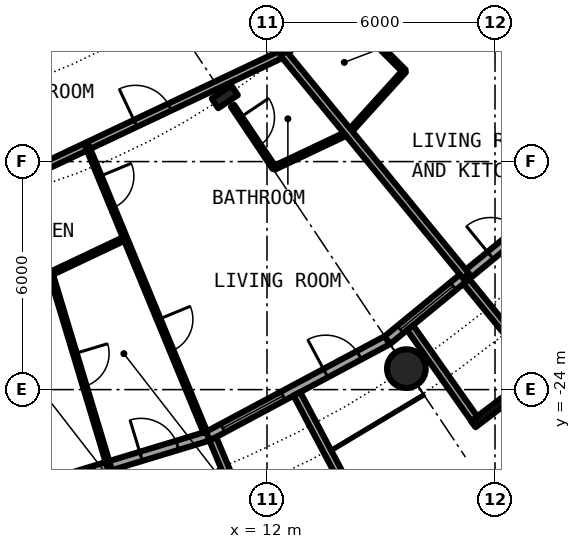
"""IFC4 building model, lengths in metres.
Left out: names, types, materials, properties, quantities, classifications, styles, units other than length and angle.
Written with IfcOpenShell. Run it as: python <this file> out.ifc"""

import sys

from ifc_helpers import new_model, si_unit, direction, frame, frame_2d, origin, origin_2d, place, context, subcontext, project, spatial, rectangle, circle, hollow_circle, i_section, extrude, element, fill, save


model = new_model("IFC4")
c1 = context("Model", 3, precision=1e-05, world=origin(), true_north=direction((0.0, 1.0)))
c2 = subcontext(c1, "Body", "Model", "MODEL_VIEW")
j1 = project(units=[si_unit("LENGTHUNIT", "METRE"), si_unit("PLANEANGLEUNIT", "RADIAN")], contexts=[c1])
p1 = place(None, origin())
s1 = spatial("IfcSite", under=j1, at=p1, CompositionType="ELEMENT")
p2 = place(p1, origin())
s2 = spatial("IfcBuilding", under=s1, at=p2, CompositionType="ELEMENT")
p3 = place(p2, frame((0.0, 0.0, 22.8)))
s3 = spatial("IfcBuildingStorey", under=s2, at=p3, CompositionType="ELEMENT", Elevation=22.8)
p4 = place(p3, frame((15.667, -23.448, 0.0), z_axis=(0.0, 0.0, 1.0), x_axis=(1.0, 0.0, 0.0)))
e1 = element("IfcColumn", 1, at=p4, inside=s3, PredefinedType="COLUMN", context=c2, shape_type="SweptSolid", body=[
    extrude(hollow_circle(Radius=0.508, WallThickness=0.05, at=origin_2d()), origin(), (0.0, 0.0, 1.0), 3.05),
])
p5 = place(p3, frame((10.889, -16.297, 0.0), z_axis=(0.0, 0.0, 1.0), x_axis=(0.55557023302, -0.831469612303, 0.0)))
e2 = element("IfcColumn", 2, at=p5, inside=s3, PredefinedType="COLUMN", context=c2, shape_type="SweptSolid", body=[
    extrude(i_section(OverallWidth=0.305, OverallDepth=0.62, WebThickness=0.021, FlangeThickness=0.04, FilletRadius=0.027, at=origin_2d()), origin(), (0.0, 0.0, 1.0), 3.05),
])
p6 = place(p3, frame((5.326, -26.775, 0.0), z_axis=(0.0, 0.0, 1.0), x_axis=(0.956965678721, 0.290201119486, 0.0)))
e3 = element("IfcWall", 3, at=p6, inside=s3, PredefinedType="SOLIDWALL", context=c2, shape_type="SweptSolid", body=[
    extrude(rectangle(XDim=5.351, YDim=0.25, at=frame_2d((2.676, 0.0))), origin(), (0.0, 0.0, 1.0), 2.7),
])
p7 = place(p6, frame((0.441, 0.0, 0.3)))
e4 = element("IfcOpeningElement", 4, at=p7, cuts=e3, PredefinedType="OPENING", context=c2, shape_type="SweptSolid", body=[
    extrude(rectangle(XDim=1.8, YDim=2.1, at=frame_2d((0.9, 1.05))), frame((0.0, 0.135, 0.0), z_axis=(0.0, -1.0, 0.0), x_axis=(1.0, 0.0, 0.0)), (0.0, 0.0, 1.0), 0.27),
])
p8 = place(p6, frame((3.51, 0.0, 0.0)))
e5 = element("IfcOpeningElement", 5, at=p8, cuts=e3, PredefinedType="OPENING", context=c2, shape_type="SweptSolid", body=[
    extrude(rectangle(XDim=1.0, YDim=2.2, at=frame_2d((0.5, 1.1))), frame((0.0, 0.135, 0.0), z_axis=(0.0, -1.0, 0.0), x_axis=(1.0, 0.0, 0.0)), (0.0, 0.0, 1.0), 0.27),
])
p9 = place(p3, frame((10.447, -25.222, 0.0), z_axis=(0.0, 0.0, 1.0), x_axis=(0.881915646801, 0.471407246368, 0.0)))
e6 = element("IfcWall", 6, at=p9, inside=s3, PredefinedType="SOLIDWALL", context=c2, shape_type="SweptSolid", body=[
    extrude(rectangle(XDim=5.352, YDim=0.25, at=frame_2d((2.676, 0.0))), origin(), (0.0, 0.0, 1.0), 2.7),
])
p10 = place(p9, frame((0.441, 0.0, 0.3)))
e7 = element("IfcOpeningElement", 7, at=p10, cuts=e6, PredefinedType="OPENING", context=c2, shape_type="SweptSolid", body=[
    extrude(rectangle(XDim=1.8, YDim=2.1, at=frame_2d((0.9, 1.05))), frame((0.0, 0.135, 0.0), z_axis=(0.0, -1.0, 0.0), x_axis=(1.0, 0.0, 0.0)), (0.0, 0.0, 1.0), 0.27),
])
p11 = place(p9, frame((3.51, 0.0, 0.0)))
e8 = element("IfcOpeningElement", 8, at=p11, cuts=e6, PredefinedType="OPENING", context=c2, shape_type="SweptSolid", body=[
    extrude(rectangle(XDim=1.0, YDim=2.2, at=frame_2d((0.5, 1.1))), frame((0.0, 0.135, 0.0), z_axis=(0.0, -1.0, 0.0), x_axis=(1.0, 0.0, 0.0)), (0.0, 0.0, 1.0), 0.27),
])
p12 = place(p3, frame((10.575, -25.295, -0.03), z_axis=(0.0, 0.0, 1.0), x_axis=(0.385697364644, -0.922625353492, 0.0)))
e9 = element("IfcWall", 9, at=p12, inside=s3, PredefinedType="SOLIDWALL", context=c2, shape_type="SweptSolid", body=[
    extrude(rectangle(XDim=2.883, YDim=0.2, at=frame_2d((1.442, 0.0))), origin(), (0.0, 0.0, 1.0), 2.73),
])
p13 = place(p3, frame((12.787, -24.113, -0.03), z_axis=(0.0, 0.0, 1.0), x_axis=(0.468365282436, -0.883534924159, 0.0)))
e10 = element("IfcWall", 10, at=p13, inside=s3, PredefinedType="SOLIDWALL", context=c2, shape_type="SweptSolid", body=[
    extrude(rectangle(XDim=3.006, YDim=0.2, at=frame_2d((1.503, 0.0))), origin(), (0.0, 0.0, 1.0), 2.73),
])
p14 = place(p3, frame((15.167, -22.699, 0.0), z_axis=(0.0, 0.0, 1.0), x_axis=(0.773019449054, 0.634382322723, 0.0)))
e11 = element("IfcWall", 11, at=p14, inside=s3, PredefinedType="SOLIDWALL", context=c2, shape_type="SweptSolid", body=[
    extrude(rectangle(XDim=5.352, YDim=0.25, at=frame_2d((2.676, 0.0))), origin(), (0.0, 0.0, 1.0), 2.7),
])
p15 = place(p14, frame((0.441, 0.0, 0.3)))
e12 = element("IfcOpeningElement", 12, at=p15, cuts=e11, PredefinedType="OPENING", context=c2, shape_type="SweptSolid", body=[
    extrude(rectangle(XDim=1.8, YDim=2.1, at=frame_2d((0.9, 1.05))), frame((0.0, 0.135, 0.0), z_axis=(0.0, -1.0, 0.0), x_axis=(1.0, 0.0, 0.0)), (0.0, 0.0, 1.0), 0.27),
])
p16 = place(p14, frame((3.51, 0.0, 0.0)))
e13 = element("IfcOpeningElement", 13, at=p16, cuts=e11, PredefinedType="OPENING", context=c2, shape_type="SweptSolid", body=[
    extrude(rectangle(XDim=1.0, YDim=2.2, at=frame_2d((0.5, 1.1))), frame((0.0, 0.135, 0.0), z_axis=(0.0, -1.0, 0.0), x_axis=(1.0, 0.0, 0.0)), (0.0, 0.0, 1.0), 0.27),
])
p17 = place(p3, frame((17.427, -24.909, -0.03), z_axis=(0.0, 0.0, 1.0), x_axis=(0.796842165306, 0.60418752353, 0.0)))
e14 = element("IfcWall", 14, at=p17, inside=s3, PredefinedType="SOLIDWALL", context=c2, shape_type="SweptSolid", body=[
    extrude(rectangle(XDim=2.337, YDim=0.2, at=frame_2d((1.168, 0.0))), origin(), (0.0, 0.0, 1.0), 2.73),
])
p18 = place(p17, frame((0.128, 0.0, 0.33)))
e15 = element("IfcOpeningElement", 15, at=p18, cuts=e14, PredefinedType="OPENING", context=c2, shape_type="SweptSolid", body=[
    extrude(circle(Radius=1.04, at=frame_2d((1.04, 1.04))), frame((0.0, 0.11, 0.0), z_axis=(0.0, -1.0, 0.0), x_axis=(1.0, 0.0, 0.0)), (0.0, 0.0, 1.0), 0.22),
])
p19 = place(p3, frame((15.765, -22.37, -0.03), z_axis=(0.0, 0.0, 1.0), x_axis=(0.576274612209, -0.817256123454, 0.0)))
e16 = element("IfcWall", 16, at=p19, inside=s3, PredefinedType="SOLIDWALL", context=c2, shape_type="SweptSolid", body=[
    extrude(rectangle(XDim=2.933, YDim=0.2, at=frame_2d((1.466, 0.0))), origin(), (0.0, 0.0, 1.0), 2.73),
])
p20 = place(p3, frame((17.246, -21.155, -0.03), z_axis=(0.0, 0.0, 1.0), x_axis=(0.631741648902, -0.775179004516, 0.0)))
e17 = element("IfcWall", 17, at=p20, inside=s3, PredefinedType="SOLIDWALL", context=c2, shape_type="SweptSolid", body=[
    extrude(rectangle(XDim=3.006, YDim=0.2, at=frame_2d((1.503, 0.0))), origin(), (0.0, 0.0, 1.0), 2.73),
])
p21 = place(p3, frame((14.153, -17.234, 0.0), z_axis=(0.0, 0.0, 1.0), x_axis=(0.671144831591, 0.741326254107, 0.0)))
e18 = element("IfcWall", 18, at=p21, inside=s3, PredefinedType="PARTITIONING", context=c2, shape_type="SweptSolid", body=[
    extrude(rectangle(XDim=2.181, YDim=0.1, at=frame_2d((1.091, 0.0))), origin(), (0.0, 0.0, 1.0), 2.7),
])
p22 = place(p3, frame((4.352, -21.873, 0.0), z_axis=(0.0, 0.0, 1.0), x_axis=(0.903905215872, 0.427732814639, 0.0)))
e19 = element("IfcWall", 19, at=p22, inside=s3, PredefinedType="PARTITIONING", context=c2, shape_type="SweptSolid", body=[
    extrude(rectangle(XDim=4.334, YDim=0.1, at=frame_2d((2.167, 0.0))), origin(), (0.0, 0.0, 1.0), 2.7),
])
p23 = place(p3, frame((12.188, -18.165, 0.0), z_axis=(0.0, 0.0, 1.0), x_axis=(0.903905215872, 0.427732814639, 0.0)))
e20 = element("IfcWall", 20, at=p23, inside=s3, PredefinedType="PARTITIONING", context=c2, shape_type="SweptSolid", body=[
    extrude(rectangle(XDim=2.167, YDim=0.1, at=frame_2d((1.083, 0.0))), origin(), (0.0, 0.0, 1.0), 2.7),
])
p24 = place(p3, frame((12.434, -15.151, 0.0), z_axis=(0.0, 0.0, 1.0), x_axis=(0.671514934772, 0.740991020444, 0.0)))
e21 = element("IfcWall", 21, at=p24, inside=s3, PredefinedType="PARTITIONING", context=c2, shape_type="SweptSolid", body=[
    extrude(rectangle(XDim=5.598, YDim=0.2, at=frame_2d((2.799, 0.0))), origin(), (0.0, 0.0, 1.0), 2.38),
])
p25 = place(p24, frame((3.305, 0.0, 0.0)))
e22 = element("IfcOpeningElement", 22, at=p25, cuts=e21, PredefinedType="OPENING", context=c2, shape_type="SweptSolid", body=[
    extrude(rectangle(XDim=1.0, YDim=2.3, at=frame_2d((0.5, 1.15))), frame((0.0, 0.11, 0.0), z_axis=(0.0, -1.0, 0.0), x_axis=(1.0, 0.0, 0.0)), (0.0, 0.0, 1.0), 0.22),
])
p26 = place(p3, frame((3.966, -19.156, 0.0), z_axis=(0.0, 0.0, 1.0), x_axis=(0.90398275529, 0.427568916244, 0.0)))
e23 = element("IfcWall", 23, at=p26, inside=s3, PredefinedType="PARTITIONING", context=c2, shape_type="SweptSolid", body=[
    extrude(rectangle(XDim=9.372, YDim=0.2, at=frame_2d((4.686, 0.0))), origin(), (0.0, 0.0, 1.0), 2.38),
])
p27 = place(p26, frame((5.058, 0.0, 0.0)))
e24 = element("IfcOpeningElement", 24, at=p27, cuts=e23, PredefinedType="OPENING", context=c2, shape_type="SweptSolid", body=[
    extrude(rectangle(XDim=1.0, YDim=2.3, at=frame_2d((0.5, 1.15))), frame((0.0, 0.11, 0.0), z_axis=(0.0, -1.0, 0.0), x_axis=(1.0, 0.0, 0.0)), (0.0, 0.0, 1.0), 0.22),
])
p28 = place(p3, frame((3.297, -16.575, 0.0), z_axis=(0.0, 0.0, 1.0), x_axis=(0.83154870872, 0.55545183862, 0.0)))
e25 = element("IfcWall", 25, at=p28, inside=s3, PredefinedType="PARTITIONING", context=c2, shape_type="SweptSolid", body=[
    extrude(rectangle(XDim=11.315, YDim=0.2, at=frame_2d((5.657, 0.0))), origin(), (0.0, 0.0, 1.0), 2.7),
])
p29 = place(p28, frame((4.352, 0.0, 0.0)))
e26 = element("IfcOpeningElement", 26, at=p29, cuts=e25, PredefinedType="OPENING", context=c2, shape_type="SweptSolid", body=[
    extrude(rectangle(XDim=1.0, YDim=2.3, at=frame_2d((0.5, 1.15))), frame((0.0, 0.11, 0.0), z_axis=(0.0, -1.0, 0.0), x_axis=(1.0, 0.0, 0.0)), (0.0, 0.0, 1.0), 0.22),
])
p30 = place(p3, frame((6.31, -20.945, 0.0), z_axis=(0.0, 0.0, 1.0), x_axis=(0.288484435279, -0.957484585047, 0.0)))
e27 = element("IfcWall", 27, at=p30, inside=s3, PredefinedType="PARTITIONING", context=c2, shape_type="SweptSolid", body=[
    extrude(rectangle(XDim=5.3, YDim=0.1, at=frame_2d((2.65, 0.0))), origin(), (0.0, 0.0, 1.0), 2.7),
])
p31 = place(p30, frame((2.2, 0.0, 0.0)))
e28 = element("IfcOpeningElement", 28, at=p31, cuts=e27, PredefinedType="OPENING", context=c2, shape_type="SweptSolid", body=[
    extrude(rectangle(XDim=0.9, YDim=2.3, at=frame_2d((0.45, 1.15))), frame((0.0, 0.06, 0.0), z_axis=(0.0, -1.0, 0.0), x_axis=(1.0, 0.0, 0.0)), (0.0, 0.0, 1.0), 0.12),
])
p32 = place(p3, frame((7.268, -17.594, 0.0), z_axis=(0.0, 0.0, 1.0), x_axis=(0.381763497026, -0.924260045841, 0.0)))
e29 = element("IfcWall", 29, at=p32, inside=s3, PredefinedType="PARTITIONING", context=c2, shape_type="SweptSolid", body=[
    extrude(rectangle(XDim=8.138, YDim=0.1, at=frame_2d((4.069, 0.0))), origin(), (0.0, 0.0, 1.0), 2.7),
])
p33 = place(p32, frame((0.861, 0.0, 0.0)))
e30 = element("IfcOpeningElement", 30, at=p33, cuts=e29, PredefinedType="OPENING", context=c2, shape_type="SweptSolid", body=[
    extrude(rectangle(XDim=0.9, YDim=2.3, at=frame_2d((0.45, 1.15))), frame((0.0, 0.06, 0.0), z_axis=(0.0, -1.0, 0.0), x_axis=(1.0, 0.0, 0.0)), (0.0, 0.0, 1.0), 0.12),
])
p34 = place(p32, frame((4.93, 0.0, 0.0)))
e31 = element("IfcOpeningElement", 31, at=p34, cuts=e29, PredefinedType="OPENING", context=c2, shape_type="SweptSolid", body=[
    extrude(rectangle(XDim=0.9, YDim=2.3, at=frame_2d((0.45, 1.15))), frame((0.0, 0.06, 0.0), z_axis=(0.0, -1.0, 0.0), x_axis=(1.0, 0.0, 0.0)), (0.0, 0.0, 1.0), 0.12),
])
p35 = place(p3, frame((11.093, -16.533, 0.0), z_axis=(0.0, 0.0, 1.0), x_axis=(0.557134474719, -0.830422288405, 0.0)))
e32 = element("IfcWall", 32, at=p35, inside=s3, PredefinedType="PARTITIONING", context=c2, shape_type="SweptSolid", body=[
    extrude(rectangle(XDim=1.965, YDim=0.1, at=frame_2d((0.983, 0.0))), origin(), (0.0, 0.0, 1.0), 2.7),
])
p36 = place(p35, frame((0.366, 0.0, 0.0)))
e33 = element("IfcOpeningElement", 33, at=p36, cuts=e32, PredefinedType="OPENING", context=c2, shape_type="SweptSolid", body=[
    extrude(rectangle(XDim=0.9, YDim=2.3, at=frame_2d((0.45, 1.15))), frame((0.0, 0.06, 0.0), z_axis=(0.0, -1.0, 0.0), x_axis=(1.0, 0.0, 0.0)), (0.0, 0.0, 1.0), 0.12),
])
p37 = place(p3, frame((12.432, -15.152, 0.0), z_axis=(0.0, 0.0, 1.0), x_axis=(0.634353152115, -0.77304338714, 0.0)))
e34 = element("IfcWall", 34, at=p37, inside=s3, PredefinedType="PARTITIONING", context=c2, shape_type="SweptSolid", body=[
    extrude(rectangle(XDim=7.576, YDim=0.2, at=frame_2d((3.788, 0.0))), origin(), (0.0, 0.0, 1.0), 2.7),
])
p38 = place(p3, frame((13.723, -13.729, 0.0), z_axis=(0.0, 0.0, 1.0), x_axis=(0.706741540154, -0.707471833659, 0.0)))
e35 = element("IfcWall", 35, at=p38, inside=s3, PredefinedType="PARTITIONING", context=c2, shape_type="SweptSolid", body=[
    extrude(rectangle(XDim=2.674, YDim=0.1, at=frame_2d((1.337, 0.0))), origin(), (0.0, 0.0, 1.0), 2.7),
])
p39 = place(p38, frame((0.887, 0.0, 0.0)))
e36 = element("IfcOpeningElement", 36, at=p39, cuts=e35, PredefinedType="OPENING", context=c2, shape_type="SweptSolid", body=[
    extrude(rectangle(XDim=0.9, YDim=2.3, at=frame_2d((0.45, 1.15))), frame((0.0, 0.06, 0.0), z_axis=(0.0, -1.0, 0.0), x_axis=(1.0, 0.0, 0.0)), (0.0, 0.0, 1.0), 0.12),
])
p40 = place(p3, frame((16.555, -11.061, 0.0), z_axis=(0.0, 0.0, 1.0), x_axis=(0.831465568067, -0.555576285599, 0.0)))
e37 = element("IfcWall", 37, at=p40, inside=s3, PredefinedType="PARTITIONING", context=c2, shape_type="SweptSolid", body=[
    extrude(rectangle(XDim=7.264, YDim=0.2, at=frame_2d((3.632, 0.0))), origin(), (0.0, 0.0, 1.0), 2.7),
])
p41 = place(p3, frame((17.077, -14.006, 0.0), z_axis=(0.0, 0.0, 1.0), x_axis=(0.77326214499, -0.634086472908, 0.0)))
e38 = element("IfcWall", 38, at=p41, inside=s3, PredefinedType="PARTITIONING", context=c2, shape_type="SweptSolid", body=[
    extrude(rectangle(XDim=5.089, YDim=0.1, at=frame_2d((2.544, 0.0))), origin(), (0.0, 0.0, 1.0), 2.7),
])
p42 = place(p41, frame((2.094, 0.0, 0.0)))
e39 = element("IfcOpeningElement", 39, at=p42, cuts=e38, PredefinedType="OPENING", context=c2, shape_type="SweptSolid", body=[
    extrude(rectangle(XDim=0.9, YDim=2.3, at=frame_2d((0.45, 1.15))), frame((0.0, 0.06, 0.0), z_axis=(0.0, -1.0, 0.0), x_axis=(1.0, 0.0, 0.0)), (0.0, 0.0, 1.0), 0.12),
])
p43 = place(p8, origin())
e40 = element("IfcDoor", 40, at=p43, inside=s3, OperationType="SINGLE_SWING_LEFT", PredefinedType="DOOR", context=c2, shape_type="SweptSolid", body=[
    extrude(rectangle(XDim=1.0, YDim=2.2, at=frame_2d((0.5, 1.1))), frame((0.0, 0.025, 0.0), z_axis=(0.0, -1.0, 0.0), x_axis=(1.0, 0.0, 0.0)), (0.0, 0.0, 1.0), 0.05),
])
fill(e5, e40)
p44 = place(p10, origin())
e41 = element("IfcWindow", 41, at=p44, inside=s3, PartitioningType="SINGLE_PANEL", PredefinedType="WINDOW", context=c2, shape_type="SweptSolid", body=[
    extrude(rectangle(XDim=1.8, YDim=2.1, at=frame_2d((0.9, 1.05))), frame((0.0, 0.03, 0.0), z_axis=(0.0, -1.0, 0.0), x_axis=(1.0, 0.0, 0.0)), (0.0, 0.0, 1.0), 0.06),
])
fill(e7, e41)
p45 = place(p11, origin())
e42 = element("IfcDoor", 42, at=p45, inside=s3, OperationType="SINGLE_SWING_LEFT", PredefinedType="DOOR", context=c2, shape_type="SweptSolid", body=[
    extrude(rectangle(XDim=1.0, YDim=2.2, at=frame_2d((0.5, 1.1))), frame((0.0, 0.025, 0.0), z_axis=(0.0, -1.0, 0.0), x_axis=(1.0, 0.0, 0.0)), (0.0, 0.0, 1.0), 0.05),
])
fill(e8, e42)
p46 = place(p15, origin())
e43 = element("IfcWindow", 43, at=p46, inside=s3, PartitioningType="SINGLE_PANEL", PredefinedType="WINDOW", context=c2, shape_type="SweptSolid", body=[
    extrude(rectangle(XDim=1.8, YDim=2.1, at=frame_2d((0.9, 1.05))), frame((0.0, 0.03, 0.0), z_axis=(0.0, -1.0, 0.0), x_axis=(1.0, 0.0, 0.0)), (0.0, 0.0, 1.0), 0.06),
])
fill(e12, e43)
p47 = place(p18, origin())
e44 = element("IfcWindow", 44, at=p47, inside=s3, PartitioningType="SINGLE_PANEL", PredefinedType="WINDOW", context=c2, shape_type="SweptSolid", body=[
    extrude(circle(Radius=1.04, at=frame_2d((1.04, 1.04))), frame((0.0, 0.03, 0.0), z_axis=(0.0, -1.0, 0.0), x_axis=(1.0, 0.0, 0.0)), (0.0, 0.0, 1.0), 0.06),
])
fill(e15, e44)
p48 = place(p16, origin())
e45 = element("IfcDoor", 45, at=p48, inside=s3, OperationType="SINGLE_SWING_LEFT", PredefinedType="DOOR", context=c2, shape_type="SweptSolid", body=[
    extrude(rectangle(XDim=1.0, YDim=2.2, at=frame_2d((0.5, 1.1))), frame((0.0, 0.025, 0.0), z_axis=(0.0, -1.0, 0.0), x_axis=(1.0, 0.0, 0.0)), (0.0, 0.0, 1.0), 0.05),
])
fill(e13, e45)
p49 = place(p27, origin())
e46 = element("IfcDoor", 46, at=p49, inside=s3, OperationType="SINGLE_SWING_RIGHT", PredefinedType="DOOR", context=c2, shape_type="SweptSolid", body=[
    extrude(rectangle(XDim=1.0, YDim=2.3, at=frame_2d((0.5, 1.15))), frame((0.0, 0.025, 0.0), z_axis=(0.0, -1.0, 0.0), x_axis=(1.0, 0.0, 0.0)), (0.0, 0.0, 1.0), 0.05),
])
fill(e24, e46)
p50 = place(p36, origin())
e47 = element("IfcDoor", 47, at=p50, inside=s3, OperationType="SINGLE_SWING_LEFT", PredefinedType="DOOR", context=c2, shape_type="SweptSolid", body=[
    extrude(rectangle(XDim=0.9, YDim=2.3, at=frame_2d((0.45, 1.15))), frame((0.0, 0.025, 0.0), z_axis=(0.0, -1.0, 0.0), x_axis=(1.0, 0.0, 0.0)), (0.0, 0.0, 1.0), 0.05),
])
fill(e33, e47)
p51 = place(p33, origin())
e48 = element("IfcDoor", 48, at=p51, inside=s3, OperationType="SINGLE_SWING_LEFT", PredefinedType="DOOR", context=c2, shape_type="SweptSolid", body=[
    extrude(rectangle(XDim=0.9, YDim=2.3, at=frame_2d((0.45, 1.15))), frame((0.0, 0.025, 0.0), z_axis=(0.0, -1.0, 0.0), x_axis=(1.0, 0.0, 0.0)), (0.0, 0.0, 1.0), 0.05),
])
fill(e30, e48)
p52 = place(p34, origin())
e49 = element("IfcDoor", 49, at=p52, inside=s3, OperationType="SINGLE_SWING_RIGHT", PredefinedType="DOOR", context=c2, shape_type="SweptSolid", body=[
    extrude(rectangle(XDim=0.9, YDim=2.3, at=frame_2d((0.45, 1.15))), frame((0.0, 0.025, 0.0), z_axis=(0.0, -1.0, 0.0), x_axis=(1.0, 0.0, 0.0)), (0.0, 0.0, 1.0), 0.05),
])
fill(e31, e49)
p53 = place(p31, origin())
e50 = element("IfcDoor", 50, at=p53, inside=s3, OperationType="SINGLE_SWING_RIGHT", PredefinedType="DOOR", context=c2, shape_type="SweptSolid", body=[
    extrude(rectangle(XDim=0.9, YDim=2.3, at=frame_2d((0.45, 1.15))), frame((0.0, 0.025, 0.0), z_axis=(0.0, -1.0, 0.0), x_axis=(1.0, 0.0, 0.0)), (0.0, 0.0, 1.0), 0.05),
])
fill(e28, e50)
save(model, sys.argv[1])
